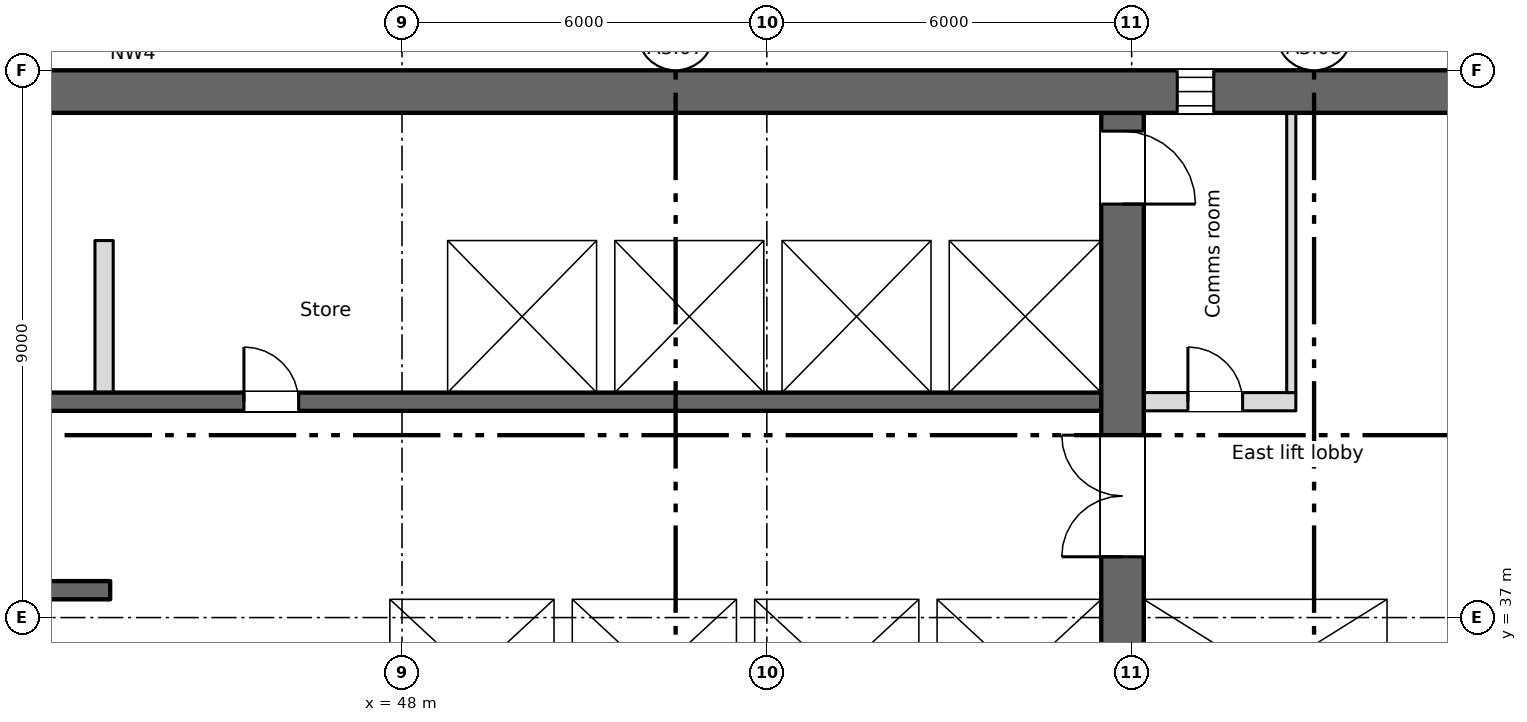
"""IFC4 building model, lengths in metres.
Left out: names, types, materials, properties, quantities, classifications, styles, units other than length and angle.
Written with IfcOpenShell. Run it as: python <this file> out.ifc"""

import sys

from ifc_helpers import new_model, si_unit, direction, frame, frame_2d, origin, place, context, subcontext, project, spatial, rectangle, extrude, element, fill, save


model = new_model("IFC4")
c1 = context("Model", 3, precision=1e-05, world=origin(), true_north=direction((0.0, 1.0)))
c2 = subcontext(c1, "Body", "Model", "MODEL_VIEW")
j1 = project(units=[si_unit("LENGTHUNIT", "METRE"), si_unit("PLANEANGLEUNIT", "RADIAN")], contexts=[c1])
p1 = place(None, origin())
s1 = spatial("IfcSite", under=j1, at=p1, CompositionType="ELEMENT")
p2 = place(p1, origin())
s2 = spatial("IfcBuilding", under=s1, at=p2, CompositionType="ELEMENT")
p3 = place(p2, frame((0.0, 0.0, 189.25)))
s3 = spatial("IfcBuildingStorey", under=s2, at=p3, CompositionType="ELEMENT", Elevation=189.25)
p4 = place(p3, frame((11.55, 45.65, 0.0), z_axis=(0.0, 0.0, 1.0), x_axis=(1.0, 0.0, 0.0)))
e1 = element("IfcWall", 1, at=p4, inside=s3, PredefinedType="SHEAR", context=c2, shape_type="SweptSolid", body=[
    extrude(rectangle(XDim=54.9, YDim=0.7, at=frame_2d((27.45, 0.0))), origin(), (0.0, 0.0, 1.0), 3.35),
])
p5 = place(p4, frame((1.2, 0.0, 0.6)))
e2 = element("IfcOpeningElement", 2, at=p5, cuts=e1, PredefinedType="OPENING", context=c2, shape_type="SweptSolid", body=[
    extrude(rectangle(XDim=0.6, YDim=2.4, at=frame_2d((0.3, 1.2))), frame((0.0, 0.36, 0.0), z_axis=(0.0, -1.0, 0.0), x_axis=(1.0, 0.0, 0.0)), (0.0, 0.0, 1.0), 0.72),
])
p6 = place(p4, frame((49.2, 0.0, 0.6)))
e3 = element("IfcOpeningElement", 3, at=p6, cuts=e1, PredefinedType="OPENING", context=c2, shape_type="SweptSolid", body=[
    extrude(rectangle(XDim=0.6, YDim=2.4, at=frame_2d((0.3, 1.2))), frame((0.0, 0.36, 0.0), z_axis=(0.0, -1.0, 0.0), x_axis=(1.0, 0.0, 0.0)), (0.0, 0.0, 1.0), 0.72),
])
p7 = place(p3, frame((64.35, 34.8, 0.0), z_axis=(0.0, 0.0, 1.0), x_axis=(0.0, 1.0, 0.0)))
e4 = element("IfcWall", 4, at=p7, inside=s3, PredefinedType="SHEAR", context=c2, shape_type="SweptSolid", body=[
    extrude(rectangle(XDim=10.5, YDim=0.3, at=frame_2d((5.25, 0.0))), origin(), (0.0, 0.0, 1.0), 3.35),
])
p8 = place(p3, frame((59.85, 28.4, 0.0), z_axis=(0.0, 0.0, 1.0), x_axis=(0.0, 1.0, 0.0)))
e5 = element("IfcWall", 5, at=p8, inside=s3, PredefinedType="SHEAR", context=c2, shape_type="SweptSolid", body=[
    extrude(rectangle(XDim=16.9, YDim=0.7, at=frame_2d((8.45, 0.0))), origin(), (0.0, 0.0, 1.0), 3.35),
])
p9 = place(p8, frame((9.6, 0.0, 0.0)))
e6 = element("IfcOpeningElement", 6, at=p9, cuts=e5, PredefinedType="OPENING", context=c2, shape_type="SweptSolid", body=[
    extrude(rectangle(XDim=2.0, YDim=2.1, at=frame_2d((1.0, 1.05))), frame((0.0, 0.36, 0.0), z_axis=(0.0, -1.0, 0.0), x_axis=(1.0, 0.0, 0.0)), (0.0, 0.0, 1.0), 0.72),
])
p10 = place(p8, frame((15.4, 0.0, 0.0)))
e7 = element("IfcOpeningElement", 7, at=p10, cuts=e5, PredefinedType="OPENING", context=c2, shape_type="SweptSolid", body=[
    extrude(rectangle(XDim=1.2, YDim=2.1, at=frame_2d((0.6, 1.05))), frame((0.0, 0.36, 0.0), z_axis=(0.0, -1.0, 0.0), x_axis=(1.0, 0.0, 0.0)), (0.0, 0.0, 1.0), 0.72),
])
p11 = place(p3, frame((43.2, 37.45, 0.0), z_axis=(0.0, 0.0, 1.0), x_axis=(-1.0, 0.0, 0.0)))
e8 = element("IfcWall", 8, at=p11, inside=s3, PredefinedType="SHEAR", context=c2, shape_type="SweptSolid", body=[
    extrude(rectangle(XDim=8.4, YDim=0.3, at=frame_2d((4.2, 0.0))), origin(), (0.0, 0.0, 1.0), 3.35),
])
p12 = place(p11, frame((3.75, 0.0, 0.0)))
e9 = element("IfcOpeningElement", 9, at=p12, cuts=e8, PredefinedType="OPENING", context=c2, shape_type="SweptSolid", body=[
    extrude(rectangle(XDim=0.9, YDim=2.1, at=frame_2d((0.45, 1.05))), frame((0.0, 0.16, 0.0), z_axis=(0.0, -1.0, 0.0), x_axis=(1.0, 0.0, 0.0)), (0.0, 0.0, 1.0), 0.32),
])
p13 = place(p3, frame((47.3, 37.45, 0.0), z_axis=(0.0, 0.0, 1.0), x_axis=(1.0, 0.0, 0.0)))
e10 = element("IfcWall", 10, at=p13, inside=s3, PredefinedType="SHEAR", context=c2, shape_type="SweptSolid", body=[
    extrude(rectangle(XDim=12.2, YDim=0.3, at=frame_2d((6.1, 0.0))), origin(), (0.0, 0.0, 1.0), 3.35),
])
p14 = place(p13, frame((4.3, 0.0, 0.0)))
e11 = element("IfcOpeningElement", 11, at=p14, cuts=e10, PredefinedType="OPENING", context=c2, shape_type="SweptSolid", body=[
    extrude(rectangle(XDim=1.1, YDim=2.1, at=frame_2d((0.55, 1.05))), frame((0.0, 0.16, 0.0), z_axis=(0.0, -1.0, 0.0), x_axis=(1.0, 0.0, 0.0)), (0.0, 0.0, 1.0), 0.32),
])
p15 = place(p13, frame((7.3, 0.0, 0.0)))
e12 = element("IfcOpeningElement", 12, at=p15, cuts=e10, PredefinedType="OPENING", context=c2, shape_type="SweptSolid", body=[
    extrude(rectangle(XDim=1.1, YDim=2.1, at=frame_2d((0.55, 1.05))), frame((0.0, 0.16, 0.0), z_axis=(0.0, -1.0, 0.0), x_axis=(1.0, 0.0, 0.0)), (0.0, 0.0, 1.0), 0.32),
])
p16 = place(p13, frame((10.3, 0.0, 0.0)))
e13 = element("IfcOpeningElement", 13, at=p16, cuts=e10, PredefinedType="OPENING", context=c2, shape_type="SweptSolid", body=[
    extrude(rectangle(XDim=1.1, YDim=2.1, at=frame_2d((0.55, 1.05))), frame((0.0, 0.16, 0.0), z_axis=(0.0, -1.0, 0.0), x_axis=(1.0, 0.0, 0.0)), (0.0, 0.0, 1.0), 0.32),
])
p17 = place(p3, frame((60.2, 37.45, 0.0), z_axis=(0.0, 0.0, 1.0), x_axis=(1.0, 0.0, 0.0)))
e14 = element("IfcWall", 14, at=p17, inside=s3, PredefinedType="SHEAR", context=c2, shape_type="SweptSolid", body=[
    extrude(rectangle(XDim=4.0, YDim=0.3, at=frame_2d((2.0, 0.0))), origin(), (0.0, 0.0, 1.0), 3.35),
])
p18 = place(p17, frame((1.45, 0.0, 0.0)))
e15 = element("IfcOpeningElement", 15, at=p18, cuts=e14, PredefinedType="OPENING", context=c2, shape_type="SweptSolid", body=[
    extrude(rectangle(XDim=1.1, YDim=2.1, at=frame_2d((0.55, 1.05))), frame((0.0, 0.16, 0.0), z_axis=(0.0, -1.0, 0.0), x_axis=(1.0, 0.0, 0.0)), (0.0, 0.0, 1.0), 0.32),
])
p19 = place(p3, frame((43.05, 34.8, 0.0), z_axis=(0.0, 0.0, 1.0), x_axis=(0.0, 1.0, 0.0)))
e16 = element("IfcWall", 16, at=p19, inside=s3, PredefinedType="SHEAR", context=c2, shape_type="SweptSolid", body=[
    extrude(rectangle(XDim=2.5, YDim=0.3, at=frame_2d((1.25, 0.0))), origin(), (0.0, 0.0, 1.0), 3.35),
])
p20 = place(p3, frame((47.55, 34.8, 0.0), z_axis=(0.0, 0.0, 1.0), x_axis=(0.0, 1.0, 0.0)))
e17 = element("IfcWall", 17, at=p20, inside=s3, PredefinedType="SHEAR", context=c2, shape_type="SweptSolid", body=[
    extrude(rectangle(XDim=2.5, YDim=0.5, at=frame_2d((1.25, 0.0))), origin(), (0.0, 0.0, 1.0), 3.35),
])
p21 = place(p3, frame((50.65, 34.8, 0.0), z_axis=(0.0, 0.0, 1.0), x_axis=(0.0, 1.0, 0.0)))
e18 = element("IfcWall", 18, at=p21, inside=s3, PredefinedType="SHEAR", context=c2, shape_type="SweptSolid", body=[
    extrude(rectangle(XDim=2.5, YDim=0.3, at=frame_2d((1.25, 0.0))), origin(), (0.0, 0.0, 1.0), 3.35),
])
p22 = place(p3, frame((18.5, 40.55, 0.0), z_axis=(0.0, 0.0, 1.0), x_axis=(1.0, 0.0, 0.0)))
e19 = element("IfcWall", 19, at=p22, inside=s3, PredefinedType="SHEAR", context=c2, shape_type="SweptSolid", body=[
    extrude(rectangle(XDim=41.0, YDim=0.3, at=frame_2d((20.5, 0.0))), origin(), (0.0, 0.0, 1.0), 3.35),
])
p23 = place(p22, frame((2.15, 0.0, 0.0)))
e20 = element("IfcOpeningElement", 20, at=p23, cuts=e19, PredefinedType="OPENING", context=c2, shape_type="SweptSolid", body=[
    extrude(rectangle(XDim=0.9, YDim=2.1, at=frame_2d((0.45, 1.05))), frame((0.0, 0.16, 0.0), z_axis=(0.0, -1.0, 0.0), x_axis=(1.0, 0.0, 0.0)), (0.0, 0.0, 1.0), 0.32),
])
p24 = place(p22, frame((15.9, 0.0, 0.0)))
e21 = element("IfcOpeningElement", 21, at=p24, cuts=e19, PredefinedType="OPENING", context=c2, shape_type="SweptSolid", body=[
    extrude(rectangle(XDim=0.9, YDim=2.1, at=frame_2d((0.45, 1.05))), frame((0.0, 0.16, 0.0), z_axis=(0.0, -1.0, 0.0), x_axis=(1.0, 0.0, 0.0)), (0.0, 0.0, 1.0), 0.32),
])
p25 = place(p22, frame((21.4, 0.0, 0.0)))
e22 = element("IfcOpeningElement", 22, at=p25, cuts=e19, PredefinedType="OPENING", context=c2, shape_type="SweptSolid", body=[
    extrude(rectangle(XDim=0.9, YDim=2.1, at=frame_2d((0.45, 1.05))), frame((0.0, 0.16, 0.0), z_axis=(0.0, -1.0, 0.0), x_axis=(1.0, 0.0, 0.0)), (0.0, 0.0, 1.0), 0.32),
])
p26 = place(p22, frame((26.9, 0.0, 0.0)))
e23 = element("IfcOpeningElement", 23, at=p26, cuts=e19, PredefinedType="OPENING", context=c2, shape_type="SweptSolid", body=[
    extrude(rectangle(XDim=0.9, YDim=2.1, at=frame_2d((0.45, 1.05))), frame((0.0, 0.16, 0.0), z_axis=(0.0, -1.0, 0.0), x_axis=(1.0, 0.0, 0.0)), (0.0, 0.0, 1.0), 0.32),
])
p27 = place(p22, frame((6.175, 0.0, 0.0)))
e24 = element("IfcOpeningElement", 24, at=p27, cuts=e19, PredefinedType="OPENING", context=c2, shape_type="SweptSolid", body=[
    extrude(rectangle(XDim=1.1, YDim=2.1, at=frame_2d((0.55, 1.05))), frame((0.0, 0.16, 0.0), z_axis=(0.0, -1.0, 0.0), x_axis=(1.0, 0.0, 0.0)), (0.0, 0.0, 1.0), 0.32),
])
p28 = place(p22, frame((8.925, 0.0, 0.0)))
e25 = element("IfcOpeningElement", 25, at=p28, cuts=e19, PredefinedType="OPENING", context=c2, shape_type="SweptSolid", body=[
    extrude(rectangle(XDim=1.1, YDim=2.1, at=frame_2d((0.55, 1.05))), frame((0.0, 0.16, 0.0), z_axis=(0.0, -1.0, 0.0), x_axis=(1.0, 0.0, 0.0)), (0.0, 0.0, 1.0), 0.32),
])
p29 = place(p22, frame((11.675, 0.0, 0.0)))
e26 = element("IfcOpeningElement", 26, at=p29, cuts=e19, PredefinedType="OPENING", context=c2, shape_type="SweptSolid", body=[
    extrude(rectangle(XDim=1.1, YDim=2.1, at=frame_2d((0.55, 1.05))), frame((0.0, 0.16, 0.0), z_axis=(0.0, -1.0, 0.0), x_axis=(1.0, 0.0, 0.0)), (0.0, 0.0, 1.0), 0.32),
])
p30 = place(p22, frame((30.925, 0.0, 0.0)))
e27 = element("IfcOpeningElement", 27, at=p30, cuts=e19, PredefinedType="OPENING", context=c2, shape_type="SweptSolid", body=[
    extrude(rectangle(XDim=1.1, YDim=2.1, at=frame_2d((0.55, 1.05))), frame((0.0, 0.16, 0.0), z_axis=(0.0, -1.0, 0.0), x_axis=(1.0, 0.0, 0.0)), (0.0, 0.0, 1.0), 0.32),
])
p31 = place(p22, frame((33.675, 0.0, 0.0)))
e28 = element("IfcOpeningElement", 28, at=p31, cuts=e19, PredefinedType="OPENING", context=c2, shape_type="SweptSolid", body=[
    extrude(rectangle(XDim=1.1, YDim=2.1, at=frame_2d((0.55, 1.05))), frame((0.0, 0.16, 0.0), z_axis=(0.0, -1.0, 0.0), x_axis=(1.0, 0.0, 0.0)), (0.0, 0.0, 1.0), 0.32),
])
p32 = place(p22, frame((36.375, 0.0, 0.0)))
e29 = element("IfcOpeningElement", 29, at=p32, cuts=e19, PredefinedType="OPENING", context=c2, shape_type="SweptSolid", body=[
    extrude(rectangle(XDim=1.2, YDim=2.1, at=frame_2d((0.6, 1.05))), frame((0.0, 0.16, 0.0), z_axis=(0.0, -1.0, 0.0), x_axis=(1.0, 0.0, 0.0)), (0.0, 0.0, 1.0), 0.32),
])
p33 = place(p22, frame((39.15, 0.0, 0.0)))
e30 = element("IfcOpeningElement", 30, at=p33, cuts=e19, PredefinedType="OPENING", context=c2, shape_type="SweptSolid", body=[
    extrude(rectangle(XDim=1.2, YDim=2.1, at=frame_2d((0.6, 1.05))), frame((0.0, 0.16, 0.0), z_axis=(0.0, -1.0, 0.0), x_axis=(1.0, 0.0, 0.0)), (0.0, 0.0, 1.0), 0.32),
])
p34 = place(p3, frame((18.5, 43.35, 0.0), z_axis=(0.0, 0.0, 1.0), x_axis=(1.0, 0.0, 0.0)))
e31 = element("IfcWall", 31, at=p34, inside=s3, PredefinedType="SHEAR", context=c2, shape_type="SweptSolid", body=[
    extrude(rectangle(XDim=41.0, YDim=0.3, at=frame_2d((20.5, 0.0))), origin(), (0.0, 0.0, 1.0), 3.35),
])
p35 = place(p3, frame((60.2, 40.55, 0.0), z_axis=(0.0, 0.0, 1.0), x_axis=(1.0, 0.0, 0.0)))
e32 = element("IfcWall", 32, at=p35, inside=s3, PredefinedType="PARTITIONING", context=c2, shape_type="SweptSolid", body=[
    extrude(rectangle(XDim=2.5, YDim=0.3, at=frame_2d((1.25, 0.0))), origin(), (0.0, 0.0, 1.0), 3.35),
])
p36 = place(p35, frame((0.725, 0.0, 0.0)))
e33 = element("IfcOpeningElement", 33, at=p36, cuts=e32, PredefinedType="OPENING", context=c2, shape_type="SweptSolid", body=[
    extrude(rectangle(XDim=0.9, YDim=2.1, at=frame_2d((0.45, 1.05))), frame((0.0, 0.16, 0.0), z_axis=(0.0, -1.0, 0.0), x_axis=(1.0, 0.0, 0.0)), (0.0, 0.0, 1.0), 0.32),
])
for number, where, z_axis, x_axis in (
    (34, (53.65, 34.8, 0.0), (0.0, 0.0, 1.0), (0.0, 1.0, 0.0)),
    (35, (56.65, 34.8, 0.0), (0.0, 0.0, 1.0), (0.0, 1.0, 0.0)),
    (36, (48.6, 40.7, 0.0), (0.0, 0.0, 1.0), (0.0, 1.0, 0.0)),
    (37, (51.35, 40.7, 0.0), (0.0, 0.0, 1.0), (0.0, 1.0, 0.0)),
    (38, (54.1, 40.7, 0.0), (0.0, 0.0, 1.0), (0.0, 1.0, 0.0)),
    (39, (56.85, 40.7, 0.0), (0.0, 0.0, 1.0), (0.0, 1.0, 0.0)),
):
    element("IfcWall", number, at=place(p3, frame(where, z_axis=z_axis, x_axis=x_axis)), inside=s3, PredefinedType="SHEAR", context=c2, shape_type="SweptSolid", body=[
        extrude(rectangle(XDim=2.5, YDim=0.3, at=frame_2d((1.25, 0.0))), origin(), (0.0, 0.0, 1.0), 3.35),
    ])
p37 = place(p3, frame((62.625, 40.7, 0.0), z_axis=(0.0, 0.0, 1.0), x_axis=(0.0, 1.0, 0.0)))
e40 = element("IfcWall", 40, at=p37, inside=s3, PredefinedType="PARTITIONING", context=c2, shape_type="SweptSolid", body=[
    extrude(rectangle(XDim=4.6, YDim=0.15, at=frame_2d((2.3, 0.0))), origin(), (0.0, 0.0, 1.0), 3.35),
])
p38 = place(p3, frame((43.1, 40.7, 0.0), z_axis=(0.0, 0.0, 1.0), x_axis=(0.0, 1.0, 0.0)))
e41 = element("IfcWall", 41, at=p38, inside=s3, PredefinedType="PARTITIONING", context=c2, shape_type="SweptSolid", body=[
    extrude(rectangle(XDim=2.5, YDim=0.3, at=frame_2d((1.25, 0.0))), origin(), (0.0, 0.0, 1.0), 3.35),
])
p39 = place(p6, origin())
e42 = element("IfcWindow", 42, at=p39, inside=s3, PartitioningType="SINGLE_PANEL", PredefinedType="WINDOW", context=c2, shape_type="SweptSolid", body=[
    extrude(rectangle(XDim=0.6, YDim=2.4, at=frame_2d((0.3, 1.2))), frame((0.0, 0.03, 0.0), z_axis=(0.0, -1.0, 0.0), x_axis=(1.0, 0.0, 0.0)), (0.0, 0.0, 1.0), 0.06),
])
fill(e3, e42)
p40 = place(p36, origin())
e43 = element("IfcDoor", 43, at=p40, inside=s3, OperationType="SINGLE_SWING_LEFT", PredefinedType="DOOR", context=c2, shape_type="SweptSolid", body=[
    extrude(rectangle(XDim=0.9, YDim=2.1, at=frame_2d((0.45, 1.05))), frame((0.0, 0.025, 0.0), z_axis=(0.0, -1.0, 0.0), x_axis=(1.0, 0.0, 0.0)), (0.0, 0.0, 1.0), 0.05),
])
fill(e33, e43)
p41 = place(p26, origin())
e44 = element("IfcDoor", 44, at=p41, inside=s3, OperationType="SINGLE_SWING_LEFT", PredefinedType="DOOR", context=c2, shape_type="SweptSolid", body=[
    extrude(rectangle(XDim=0.9, YDim=2.1, at=frame_2d((0.45, 1.05))), frame((0.0, 0.025, 0.0), z_axis=(0.0, -1.0, 0.0), x_axis=(1.0, 0.0, 0.0)), (0.0, 0.0, 1.0), 0.05),
])
fill(e23, e44)
p42 = place(p14, origin())
e45 = element("IfcDoor", 45, at=p42, inside=s3, OperationType="SLIDING_TO_LEFT", PredefinedType="DOOR", context=c2, shape_type="SweptSolid", body=[
    extrude(rectangle(XDim=1.1, YDim=2.1, at=frame_2d((0.55, 1.05))), frame((0.0, 0.025, 0.0), z_axis=(0.0, -1.0, 0.0), x_axis=(1.0, 0.0, 0.0)), (0.0, 0.0, 1.0), 0.05),
])
fill(e11, e45)
p43 = place(p15, origin())
e46 = element("IfcDoor", 46, at=p43, inside=s3, OperationType="SLIDING_TO_LEFT", PredefinedType="DOOR", context=c2, shape_type="SweptSolid", body=[
    extrude(rectangle(XDim=1.1, YDim=2.1, at=frame_2d((0.55, 1.05))), frame((0.0, 0.025, 0.0), z_axis=(0.0, -1.0, 0.0), x_axis=(1.0, 0.0, 0.0)), (0.0, 0.0, 1.0), 0.05),
])
fill(e12, e46)
p44 = place(p16, origin())
e47 = element("IfcDoor", 47, at=p44, inside=s3, OperationType="SLIDING_TO_LEFT", PredefinedType="DOOR", context=c2, shape_type="SweptSolid", body=[
    extrude(rectangle(XDim=1.1, YDim=2.1, at=frame_2d((0.55, 1.05))), frame((0.0, 0.025, 0.0), z_axis=(0.0, -1.0, 0.0), x_axis=(1.0, 0.0, 0.0)), (0.0, 0.0, 1.0), 0.05),
])
fill(e13, e47)
p45 = place(p30, origin())
e48 = element("IfcDoor", 48, at=p45, inside=s3, OperationType="SLIDING_TO_LEFT", PredefinedType="DOOR", context=c2, shape_type="SweptSolid", body=[
    extrude(rectangle(XDim=1.1, YDim=2.1, at=frame_2d((0.55, 1.05))), frame((0.0, 0.025, 0.0), z_axis=(0.0, -1.0, 0.0), x_axis=(1.0, 0.0, 0.0)), (0.0, 0.0, 1.0), 0.05),
])
fill(e27, e48)
p46 = place(p31, origin())
e49 = element("IfcDoor", 49, at=p46, inside=s3, OperationType="SLIDING_TO_LEFT", PredefinedType="DOOR", context=c2, shape_type="SweptSolid", body=[
    extrude(rectangle(XDim=1.1, YDim=2.1, at=frame_2d((0.55, 1.05))), frame((0.0, 0.025, 0.0), z_axis=(0.0, -1.0, 0.0), x_axis=(1.0, 0.0, 0.0)), (0.0, 0.0, 1.0), 0.05),
])
fill(e28, e49)
p47 = place(p32, origin())
e50 = element("IfcDoor", 50, at=p47, inside=s3, OperationType="SLIDING_TO_LEFT", PredefinedType="DOOR", context=c2, shape_type="SweptSolid", body=[
    extrude(rectangle(XDim=1.2, YDim=2.1, at=frame_2d((0.6, 1.05))), frame((0.0, 0.025, 0.0), z_axis=(0.0, -1.0, 0.0), x_axis=(1.0, 0.0, 0.0)), (0.0, 0.0, 1.0), 0.05),
])
fill(e29, e50)
p48 = place(p33, origin())
e51 = element("IfcDoor", 51, at=p48, inside=s3, OperationType="SLIDING_TO_LEFT", PredefinedType="DOOR", context=c2, shape_type="SweptSolid", body=[
    extrude(rectangle(XDim=1.2, YDim=2.1, at=frame_2d((0.6, 1.05))), frame((0.0, 0.025, 0.0), z_axis=(0.0, -1.0, 0.0), x_axis=(1.0, 0.0, 0.0)), (0.0, 0.0, 1.0), 0.05),
])
fill(e30, e51)
p49 = place(p18, origin())
e52 = element("IfcDoor", 52, at=p49, inside=s3, OperationType="SLIDING_TO_LEFT", PredefinedType="DOOR", context=c2, shape_type="SweptSolid", body=[
    extrude(rectangle(XDim=1.1, YDim=2.1, at=frame_2d((0.55, 1.05))), frame((0.0, 0.025, 0.0), z_axis=(0.0, -1.0, 0.0), x_axis=(1.0, 0.0, 0.0)), (0.0, 0.0, 1.0), 0.05),
])
fill(e15, e52)
p50 = place(p9, origin())
e53 = element("IfcDoor", 53, at=p50, inside=s3, OperationType="DOUBLE_DOOR_SINGLE_SWING", PredefinedType="DOOR", context=c2, shape_type="SweptSolid", body=[
    extrude(rectangle(XDim=2.0, YDim=2.1, at=frame_2d((1.0, 1.05))), frame((0.0, 0.025, 0.0), z_axis=(0.0, -1.0, 0.0), x_axis=(1.0, 0.0, 0.0)), (0.0, 0.0, 1.0), 0.05),
])
fill(e6, e53)
p51 = place(p10, origin())
e54 = element("IfcDoor", 54, at=p51, inside=s3, OperationType="SINGLE_SWING_LEFT", PredefinedType="DOOR", context=c2, shape_type="SweptSolid", body=[
    extrude(rectangle(XDim=1.2, YDim=2.1, at=frame_2d((0.6, 1.05))), frame((0.0, 0.025, 0.0), z_axis=(0.0, -1.0, 0.0), x_axis=(1.0, 0.0, 0.0)), (0.0, 0.0, 1.0), 0.05),
])
fill(e7, e54)
save(model, sys.argv[1])
